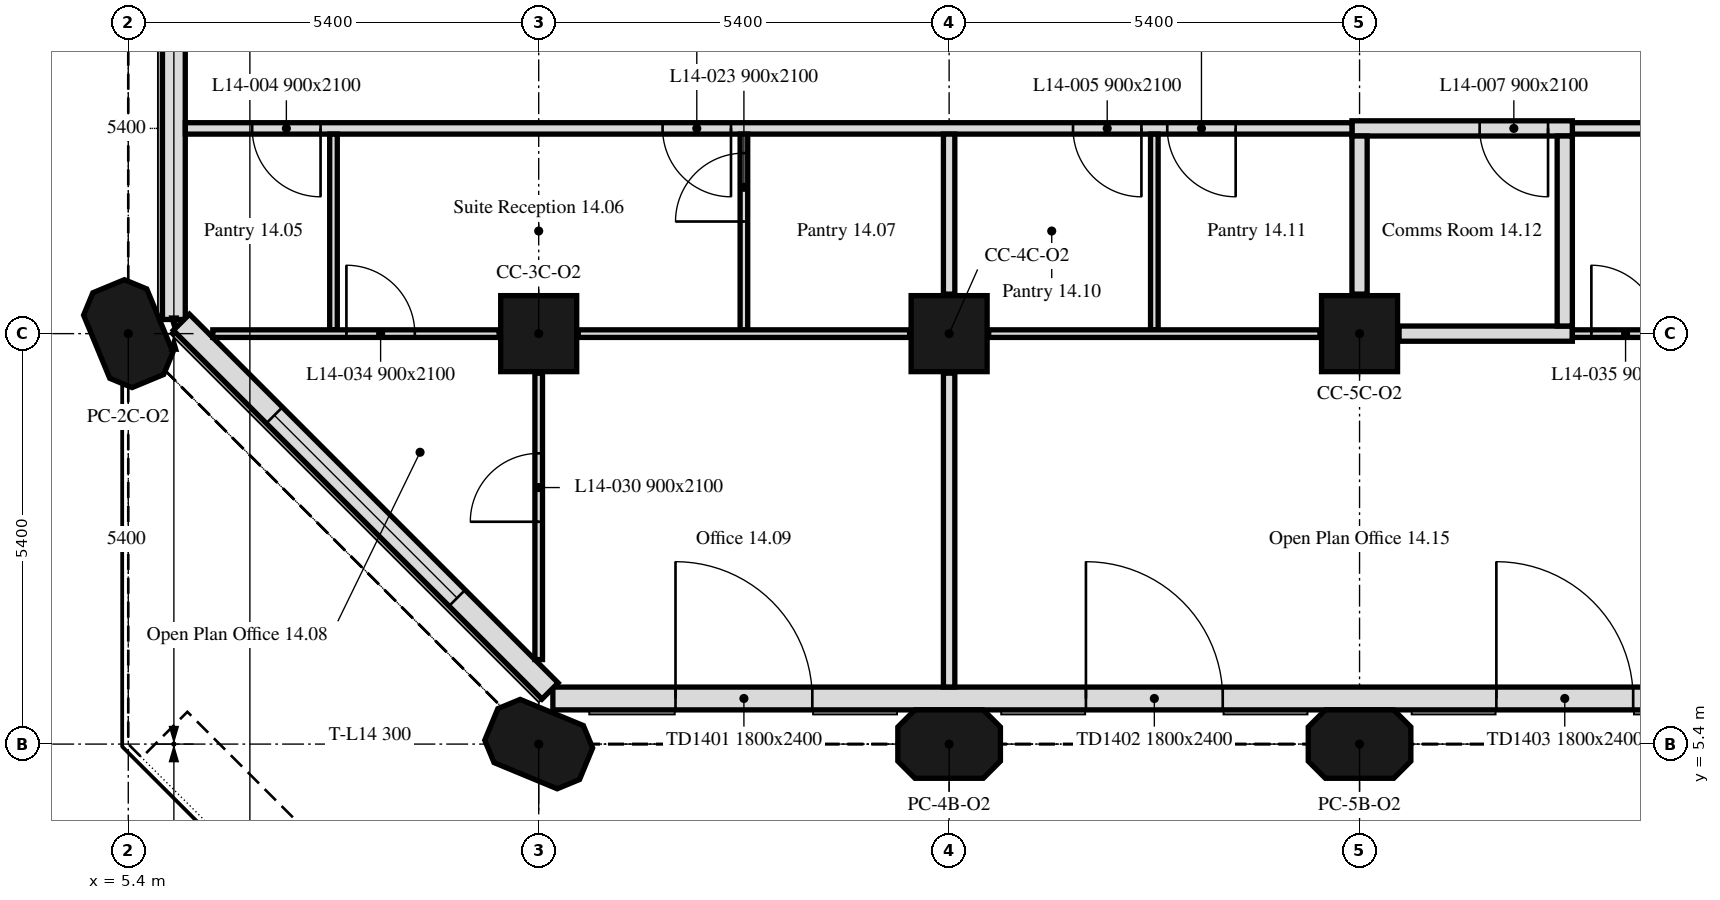
"""IFC4 building model, lengths in metres.
Left out: names, types, materials, properties, quantities, classifications, styles, units other than length and angle.
Written with IfcOpenShell. Run it as: python <this file> out.ifc"""

import sys

from ifc_helpers import new_model, si_unit, direction, frame, frame_2d, origin, origin_2d, place, context, subcontext, project, spatial, polyline, rectangle, outline, extrude, element, fill, save


model = new_model("IFC4")
c1 = context("Model", 3, precision=1e-05, world=origin(), true_north=direction((0.0, 1.0)))
c2 = subcontext(c1, "Body", "Model", "MODEL_VIEW")
j1 = project(units=[si_unit("LENGTHUNIT", "METRE"), si_unit("PLANEANGLEUNIT", "RADIAN")], contexts=[c1])
p1 = place(None, origin())
s1 = spatial("IfcSite", under=j1, at=p1, CompositionType="ELEMENT")
p2 = place(p1, origin())
s2 = spatial("IfcBuilding", under=s1, at=p2, CompositionType="ELEMENT")
p3 = place(p2, frame((0.0, 0.0, 65.0)))
s3 = spatial("IfcBuildingStorey", under=s2, at=p3, CompositionType="ELEMENT", Elevation=65.0)
for number, where, z_axis, x_axis in (
    (1, (10.8, 5.4, 0.0), (0.0, 0.0, 1.0), (-0.924, 0.383, 0.0)),
    (2, (16.2, 5.4, 0.0), (0.0, 0.0, 1.0), (1.0, 0.0, 0.0)),
    (3, (21.6, 5.4, 0.0), (0.0, 0.0, 1.0), (1.0, 0.0, 0.0)),
    (4, (5.4, 10.8, 0.0), (0.0, 0.0, 1.0), (-0.383, 0.924, 0.0)),
):
    element("IfcColumn", number, at=place(p3, frame(where, z_axis=z_axis, x_axis=x_axis)), inside=s3, PredefinedType="COLUMN", context=c2, shape_type="SweptSolid", body=[
        extrude(outline(polyline([(-0.45, -0.45), (0.45, -0.45), (0.675, -0.225), (0.675, 0.225), (0.45, 0.45), (-0.45, 0.45), (-0.675, 0.225), (-0.675, -0.225), (-0.45, -0.45)])), origin(), (0.0, 0.0, 1.0), 3.5),
    ])
for number, where, z_axis, x_axis in (
    (5, (10.8, 10.8, 0.0), (0.0, 0.0, 1.0), (1.0, 0.0, 0.0)),
    (6, (16.2, 10.8, 0.0), (0.0, 0.0, 1.0), (1.0, 0.0, 0.0)),
    (7, (21.6, 10.8, 0.0), (0.0, 0.0, 1.0), (1.0, 0.0, 0.0)),
):
    element("IfcColumn", number, at=place(p3, frame(where, z_axis=z_axis, x_axis=x_axis)), inside=s3, PredefinedType="COLUMN", context=c2, shape_type="SweptSolid", body=[
        extrude(rectangle(XDim=1.0, YDim=1.0, at=origin_2d()), origin(), (0.0, 0.0, 1.0), 3.5),
    ])
p4 = place(p3, frame((10.986, 6.0, 0.0), z_axis=(0.0, 0.0, 1.0), x_axis=(1.0, 0.0, 0.0)))
e8 = element("IfcWall", 8, at=p4, inside=s3, PredefinedType="SOLIDWALL", context=c2, shape_type="SweptSolid", body=[
    extrude(rectangle(XDim=32.027, YDim=0.3, at=frame_2d((16.014, 0.0))), origin(), (0.0, 0.0, 1.0), 3.5),
])
p5 = place(p4, frame((1.614, 0.0, 0.0)))
e9 = element("IfcOpeningElement", 9, at=p5, cuts=e8, PredefinedType="OPENING", context=c2, shape_type="SweptSolid", body=[
    extrude(rectangle(XDim=1.8, YDim=2.4, at=frame_2d((0.9, 1.2))), frame((0.0, 0.16, 0.0), z_axis=(0.0, -1.0, 0.0), x_axis=(1.0, 0.0, 0.0)), (0.0, 0.0, 1.0), 0.32),
])
p6 = place(p4, frame((7.014, 0.0, 0.0)))
e10 = element("IfcOpeningElement", 10, at=p6, cuts=e8, PredefinedType="OPENING", context=c2, shape_type="SweptSolid", body=[
    extrude(rectangle(XDim=1.8, YDim=2.4, at=frame_2d((0.9, 1.2))), frame((0.0, 0.16, 0.0), z_axis=(0.0, -1.0, 0.0), x_axis=(1.0, 0.0, 0.0)), (0.0, 0.0, 1.0), 0.32),
])
p7 = place(p4, frame((12.414, 0.0, 0.0)))
e11 = element("IfcOpeningElement", 11, at=p7, cuts=e8, PredefinedType="OPENING", context=c2, shape_type="SweptSolid", body=[
    extrude(rectangle(XDim=1.8, YDim=2.4, at=frame_2d((0.9, 1.2))), frame((0.0, 0.16, 0.0), z_axis=(0.0, -1.0, 0.0), x_axis=(1.0, 0.0, 0.0)), (0.0, 0.0, 1.0), 0.32),
])
p8 = place(p4, frame((17.814, 0.0, 0.0)))
e12 = element("IfcOpeningElement", 12, at=p8, cuts=e8, PredefinedType="OPENING", context=c2, shape_type="SweptSolid", body=[
    extrude(rectangle(XDim=1.8, YDim=2.4, at=frame_2d((0.9, 1.2))), frame((0.0, 0.16, 0.0), z_axis=(0.0, -1.0, 0.0), x_axis=(1.0, 0.0, 0.0)), (0.0, 0.0, 1.0), 0.32),
])
p9 = place(p4, frame((23.214, 0.0, 0.0)))
e13 = element("IfcOpeningElement", 13, at=p9, cuts=e8, PredefinedType="OPENING", context=c2, shape_type="SweptSolid", body=[
    extrude(rectangle(XDim=1.8, YDim=2.4, at=frame_2d((0.9, 1.2))), frame((0.0, 0.16, 0.0), z_axis=(0.0, -1.0, 0.0), x_axis=(1.0, 0.0, 0.0)), (0.0, 0.0, 1.0), 0.32),
])
p10 = place(p4, frame((28.614, 0.0, 0.0)))
e14 = element("IfcOpeningElement", 14, at=p10, cuts=e8, PredefinedType="OPENING", context=c2, shape_type="SweptSolid", body=[
    extrude(rectangle(XDim=1.8, YDim=2.4, at=frame_2d((0.9, 1.2))), frame((0.0, 0.16, 0.0), z_axis=(0.0, -1.0, 0.0), x_axis=(1.0, 0.0, 0.0)), (0.0, 0.0, 1.0), 0.32),
])
p11 = place(p3, frame((6.0, 16.2, 0.0), z_axis=(0.0, 0.0, 1.0), x_axis=(0.0, -1.0, 0.0)))
e15 = element("IfcWall", 15, at=p11, inside=s3, PredefinedType="SOLIDWALL", context=c2, shape_type="SweptSolid", body=[
    extrude(rectangle(XDim=5.214, YDim=0.3, at=frame_2d((2.607, 0.0))), origin(), (0.0, 0.0, 1.0), 3.5),
])
p12 = place(p3, frame((6.099, 10.949, 0.0), z_axis=(0.0, 0.0, 1.0), x_axis=(0.707106781187, -0.707106781187, 0.0)))
e16 = element("IfcWall", 16, at=p12, inside=s3, PredefinedType="SOLIDWALL", context=c2, shape_type="SweptSolid", body=[
    extrude(rectangle(XDim=6.86, YDim=0.3, at=frame_2d((3.43, 0.0))), origin(), (0.0, 0.0, 1.0), 3.5),
])
p13 = place(p12, frame((1.73, 0.0, 0.9)))
e17 = element("IfcOpeningElement", 17, at=p13, cuts=e16, PredefinedType="OPENING", context=c2, shape_type="SweptSolid", body=[
    extrude(rectangle(XDim=3.4, YDim=1.7, at=frame_2d((1.7, 0.85))), frame((0.0, 0.16, 0.0), z_axis=(0.0, -1.0, 0.0), x_axis=(1.0, 0.0, 0.0)), (0.0, 0.0, 1.0), 0.32),
])
p14 = place(p3, frame((37.7, 13.5, 0.0), z_axis=(0.0, 0.0, 1.0), x_axis=(-1.0, 0.0, 0.0)))
e18 = element("IfcWall", 18, at=p14, inside=s3, PredefinedType="PARTITIONING", context=c2, shape_type="SweptSolid", body=[
    extrude(rectangle(XDim=13.3, YDim=0.15, at=frame_2d((6.65, 0.0))), origin(), (0.0, 0.0, 1.0), 3.5),
])
p15 = place(p14, frame((2.15, 0.0, 0.0)))
e19 = element("IfcOpeningElement", 19, at=p15, cuts=e18, PredefinedType="OPENING", context=c2, shape_type="SweptSolid", body=[
    extrude(rectangle(XDim=0.9, YDim=2.1, at=frame_2d((0.45, 1.05))), frame((0.0, 0.075, 0.0), z_axis=(0.0, -1.0, 0.0), x_axis=(1.0, 0.0, 0.0)), (0.0, 0.0, 1.0), 0.15),
])
p16 = place(p14, frame((8.17, 0.0, 0.0)))
e20 = element("IfcOpeningElement", 20, at=p16, cuts=e18, PredefinedType="OPENING", context=c2, shape_type="SweptSolid", body=[
    extrude(rectangle(XDim=0.9, YDim=2.1, at=frame_2d((0.45, 1.05))), frame((0.0, 0.075, 0.0), z_axis=(0.0, -1.0, 0.0), x_axis=(1.0, 0.0, 0.0)), (0.0, 0.0, 1.0), 0.15),
])
p17 = place(p3, frame((24.4, 13.5, 0.0), z_axis=(0.0, 0.0, 1.0), x_axis=(-1.0, 0.0, 0.0)))
e21 = element("IfcWall", 21, at=p17, inside=s3, PredefinedType="PARTITIONING", context=c2, shape_type="SweptSolid", body=[
    extrude(rectangle(XDim=2.9, YDim=0.2, at=frame_2d((1.45, 0.0))), origin(), (0.0, 0.0, 1.0), 3.5),
])
p18 = place(p17, frame((0.32, 0.0, 0.0)))
e22 = element("IfcOpeningElement", 22, at=p18, cuts=e21, PredefinedType="OPENING", context=c2, shape_type="SweptSolid", body=[
    extrude(rectangle(XDim=0.9, YDim=2.1, at=frame_2d((0.45, 1.05))), frame((0.0, 0.1, 0.0), z_axis=(0.0, -1.0, 0.0), x_axis=(1.0, 0.0, 0.0)), (0.0, 0.0, 1.0), 0.2),
])
p19 = place(p3, frame((21.5, 13.5, 0.0), z_axis=(0.0, 0.0, 1.0), x_axis=(-1.0, 0.0, 0.0)))
e23 = element("IfcWall", 23, at=p19, inside=s3, PredefinedType="PARTITIONING", context=c2, shape_type="SweptSolid", body=[
    extrude(rectangle(XDim=15.349, YDim=0.15, at=frame_2d((7.675, 0.0))), origin(), (0.0, 0.0, 1.0), 3.5),
])
p20 = place(p19, frame((13.57, 0.0, 0.0)))
e24 = element("IfcOpeningElement", 24, at=p20, cuts=e23, PredefinedType="OPENING", context=c2, shape_type="SweptSolid", body=[
    extrude(rectangle(XDim=0.9, YDim=2.1, at=frame_2d((0.45, 1.05))), frame((0.0, 0.075, 0.0), z_axis=(0.0, -1.0, 0.0), x_axis=(1.0, 0.0, 0.0)), (0.0, 0.0, 1.0), 0.15),
])
p21 = place(p19, frame((2.77, 0.0, 0.0)))
e25 = element("IfcOpeningElement", 25, at=p21, cuts=e23, PredefinedType="OPENING", context=c2, shape_type="SweptSolid", body=[
    extrude(rectangle(XDim=0.9, YDim=2.1, at=frame_2d((0.45, 1.05))), frame((0.0, 0.075, 0.0), z_axis=(0.0, -1.0, 0.0), x_axis=(1.0, 0.0, 0.0)), (0.0, 0.0, 1.0), 0.15),
])
p22 = place(p19, frame((1.53, 0.0, 0.0)))
e26 = element("IfcOpeningElement", 26, at=p22, cuts=e23, PredefinedType="OPENING", context=c2, shape_type="SweptSolid", body=[
    extrude(rectangle(XDim=0.9, YDim=2.1, at=frame_2d((0.45, 1.05))), frame((0.0, 0.075, 0.0), z_axis=(0.0, -1.0, 0.0), x_axis=(1.0, 0.0, 0.0)), (0.0, 0.0, 1.0), 0.15),
])
p23 = place(p19, frame((8.17, 0.0, 0.0)))
e27 = element("IfcOpeningElement", 27, at=p23, cuts=e23, PredefinedType="OPENING", context=c2, shape_type="SweptSolid", body=[
    extrude(rectangle(XDim=0.9, YDim=2.1, at=frame_2d((0.45, 1.05))), frame((0.0, 0.075, 0.0), z_axis=(0.0, -1.0, 0.0), x_axis=(1.0, 0.0, 0.0)), (0.0, 0.0, 1.0), 0.15),
])
p24 = place(p3, frame((8.1, 10.85, 0.0), z_axis=(0.0, 0.0, 1.0), x_axis=(0.0, 1.0, 0.0)))
e28 = element("IfcWall", 28, at=p24, inside=s3, PredefinedType="PARTITIONING", context=c2, shape_type="SweptSolid", body=[
    extrude(rectangle(XDim=2.575, YDim=0.1, at=frame_2d((1.288, 0.0))), origin(), (0.0, 0.0, 1.0), 3.5),
])
p25 = place(p3, frame((6.512, 10.8, 0.0), z_axis=(0.0, 0.0, 1.0), x_axis=(1.0, 0.0, 0.0)))
e29 = element("IfcWall", 29, at=p25, inside=s3, PredefinedType="PARTITIONING", context=c2, shape_type="SweptSolid", body=[
    extrude(rectangle(XDim=3.768, YDim=0.1, at=frame_2d((1.884, 0.0))), origin(), (0.0, 0.0, 1.0), 3.5),
])
p26 = place(p25, frame((1.758, 0.0, 0.0)))
e30 = element("IfcOpeningElement", 30, at=p26, cuts=e29, PredefinedType="OPENING", context=c2, shape_type="SweptSolid", body=[
    extrude(rectangle(XDim=0.9, YDim=2.1, at=frame_2d((0.45, 1.05))), frame((0.0, 0.05, 0.0), z_axis=(0.0, -1.0, 0.0), x_axis=(1.0, 0.0, 0.0)), (0.0, 0.0, 1.0), 0.1),
])
p27 = place(p3, frame((13.5, 10.85, 0.0), z_axis=(0.0, 0.0, 1.0), x_axis=(0.0, 1.0, 0.0)))
e31 = element("IfcWall", 31, at=p27, inside=s3, PredefinedType="PARTITIONING", context=c2, shape_type="SweptSolid", body=[
    extrude(rectangle(XDim=2.575, YDim=0.1, at=frame_2d((1.288, 0.0))), origin(), (0.0, 0.0, 1.0), 3.5),
])
p28 = place(p27, frame((1.425, 0.0, 0.0)))
e32 = element("IfcOpeningElement", 32, at=p28, cuts=e31, PredefinedType="OPENING", context=c2, shape_type="SweptSolid", body=[
    extrude(rectangle(XDim=0.9, YDim=2.1, at=frame_2d((0.45, 1.05))), frame((0.0, 0.05, 0.0), z_axis=(0.0, -1.0, 0.0), x_axis=(1.0, 0.0, 0.0)), (0.0, 0.0, 1.0), 0.1),
])
p29 = place(p3, frame((11.32, 10.8, 0.0), z_axis=(0.0, 0.0, 1.0), x_axis=(1.0, 0.0, 0.0)))
e33 = element("IfcWall", 33, at=p29, inside=s3, PredefinedType="PARTITIONING", context=c2, shape_type="SweptSolid", body=[
    extrude(rectangle(XDim=4.36, YDim=0.1, at=frame_2d((2.18, 0.0))), origin(), (0.0, 0.0, 1.0), 3.5),
])
p30 = place(p3, frame((16.2, 11.32, 0.0), z_axis=(0.0, 0.0, 1.0), x_axis=(0.0, 1.0, 0.0)))
e34 = element("IfcWall", 34, at=p30, inside=s3, PredefinedType="PARTITIONING", context=c2, shape_type="SweptSolid", body=[
    extrude(rectangle(XDim=2.105, YDim=0.15, at=frame_2d((1.052, 0.0))), origin(), (0.0, 0.0, 1.0), 3.5),
])
p31 = place(p3, frame((10.8, 6.512, 0.0), z_axis=(0.0, 0.0, 1.0), x_axis=(0.0, 1.0, 0.0)))
e35 = element("IfcWall", 35, at=p31, inside=s3, PredefinedType="PARTITIONING", context=c2, shape_type="SweptSolid", body=[
    extrude(rectangle(XDim=3.768, YDim=0.1, at=frame_2d((1.884, 0.0))), origin(), (0.0, 0.0, 1.0), 3.5),
])
p32 = place(p31, frame((1.813, 0.0, 0.0)))
e36 = element("IfcOpeningElement", 36, at=p32, cuts=e35, PredefinedType="OPENING", context=c2, shape_type="SweptSolid", body=[
    extrude(rectangle(XDim=0.9, YDim=2.1, at=frame_2d((0.45, 1.05))), frame((0.0, 0.05, 0.0), z_axis=(0.0, -1.0, 0.0), x_axis=(1.0, 0.0, 0.0)), (0.0, 0.0, 1.0), 0.1),
])
p33 = place(p3, frame((16.2, 6.151, 0.0), z_axis=(0.0, 0.0, 1.0), x_axis=(0.0, 1.0, 0.0)))
e37 = element("IfcWall", 37, at=p33, inside=s3, PredefinedType="PARTITIONING", context=c2, shape_type="SweptSolid", body=[
    extrude(rectangle(XDim=4.129, YDim=0.15, at=frame_2d((2.064, 0.0))), origin(), (0.0, 0.0, 1.0), 3.5),
])
p34 = place(p3, frame((18.9, 10.85, 0.0), z_axis=(0.0, 0.0, 1.0), x_axis=(0.0, 1.0, 0.0)))
e38 = element("IfcWall", 38, at=p34, inside=s3, PredefinedType="PARTITIONING", context=c2, shape_type="SweptSolid", body=[
    extrude(rectangle(XDim=2.575, YDim=0.1, at=frame_2d((1.288, 0.0))), origin(), (0.0, 0.0, 1.0), 3.5),
])
p35 = place(p3, frame((16.72, 10.8, 0.0), z_axis=(0.0, 0.0, 1.0), x_axis=(1.0, 0.0, 0.0)))
e39 = element("IfcWall", 39, at=p35, inside=s3, PredefinedType="PARTITIONING", context=c2, shape_type="SweptSolid", body=[
    extrude(rectangle(XDim=4.36, YDim=0.1, at=frame_2d((2.18, 0.0))), origin(), (0.0, 0.0, 1.0), 3.5),
])
p36 = place(p3, frame((21.6, 11.32, 0.0), z_axis=(0.0, 0.0, 1.0), x_axis=(0.0, 1.0, 0.0)))
e40 = element("IfcWall", 40, at=p36, inside=s3, PredefinedType="PARTITIONING", context=c2, shape_type="SweptSolid", body=[
    extrude(rectangle(XDim=2.08, YDim=0.2, at=frame_2d((1.04, 0.0))), origin(), (0.0, 0.0, 1.0), 3.5),
])
p37 = place(p3, frame((22.12, 10.8, 0.0), z_axis=(0.0, 0.0, 1.0), x_axis=(1.0, 0.0, 0.0)))
e41 = element("IfcWall", 41, at=p37, inside=s3, PredefinedType="PARTITIONING", context=c2, shape_type="SweptSolid", body=[
    extrude(rectangle(XDim=2.28, YDim=0.2, at=frame_2d((1.14, 0.0))), origin(), (0.0, 0.0, 1.0), 3.5),
])
p38 = place(p3, frame((24.3, 10.9, 0.0), z_axis=(0.0, 0.0, 1.0), x_axis=(0.0, 1.0, 0.0)))
e42 = element("IfcWall", 42, at=p38, inside=s3, PredefinedType="PARTITIONING", context=c2, shape_type="SweptSolid", body=[
    extrude(rectangle(XDim=2.5, YDim=0.2, at=frame_2d((1.25, 0.0))), origin(), (0.0, 0.0, 1.0), 3.5),
])
p39 = place(p3, frame((24.4, 10.8, 0.0), z_axis=(0.0, 0.0, 1.0), x_axis=(1.0, 0.0, 0.0)))
e43 = element("IfcWall", 43, at=p39, inside=s3, PredefinedType="PARTITIONING", context=c2, shape_type="SweptSolid", body=[
    extrude(rectangle(XDim=2.08, YDim=0.1, at=frame_2d((1.04, 0.0))), origin(), (0.0, 0.0, 1.0), 3.5),
])
p40 = place(p39, frame((0.25, 0.0, 0.0)))
e44 = element("IfcOpeningElement", 44, at=p40, cuts=e43, PredefinedType="OPENING", context=c2, shape_type="SweptSolid", body=[
    extrude(rectangle(XDim=0.9, YDim=2.1, at=frame_2d((0.45, 1.05))), frame((0.0, 0.05, 0.0), z_axis=(0.0, -1.0, 0.0), x_axis=(1.0, 0.0, 0.0)), (0.0, 0.0, 1.0), 0.1),
])
p41 = place(p5, origin())
e45 = element("IfcDoor", 45, at=p41, inside=s3, OperationType="DOUBLE_DOOR_DOUBLE_SWING", PredefinedType="DOOR", context=c2, shape_type="SweptSolid", body=[
    extrude(rectangle(XDim=1.8, YDim=2.4, at=frame_2d((0.9, 1.2))), frame((0.0, 0.025, 0.0), z_axis=(0.0, -1.0, 0.0), x_axis=(1.0, 0.0, 0.0)), (0.0, 0.0, 1.0), 0.05),
])
fill(e9, e45)
p42 = place(p6, origin())
e46 = element("IfcDoor", 46, at=p42, inside=s3, OperationType="DOUBLE_DOOR_DOUBLE_SWING", PredefinedType="DOOR", context=c2, shape_type="SweptSolid", body=[
    extrude(rectangle(XDim=1.8, YDim=2.4, at=frame_2d((0.9, 1.2))), frame((0.0, 0.025, 0.0), z_axis=(0.0, -1.0, 0.0), x_axis=(1.0, 0.0, 0.0)), (0.0, 0.0, 1.0), 0.05),
])
fill(e10, e46)
p43 = place(p7, origin())
e47 = element("IfcDoor", 47, at=p43, inside=s3, OperationType="DOUBLE_DOOR_DOUBLE_SWING", PredefinedType="DOOR", context=c2, shape_type="SweptSolid", body=[
    extrude(rectangle(XDim=1.8, YDim=2.4, at=frame_2d((0.9, 1.2))), frame((0.0, 0.025, 0.0), z_axis=(0.0, -1.0, 0.0), x_axis=(1.0, 0.0, 0.0)), (0.0, 0.0, 1.0), 0.05),
])
fill(e11, e47)
p44 = place(p13, origin())
e48 = element("IfcWindow", 48, at=p44, inside=s3, PartitioningType="SINGLE_PANEL", PredefinedType="WINDOW", context=c2, shape_type="SweptSolid", body=[
    extrude(rectangle(XDim=3.4, YDim=1.7, at=frame_2d((1.7, 0.85))), frame((0.0, 0.03, 0.0), z_axis=(0.0, -1.0, 0.0), x_axis=(1.0, 0.0, 0.0)), (0.0, 0.0, 1.0), 0.06),
])
fill(e17, e48)
p45 = place(p20, origin())
e49 = element("IfcDoor", 49, at=p45, inside=s3, OperationType="SINGLE_SWING_LEFT", PredefinedType="DOOR", context=c2, shape_type="SweptSolid", body=[
    extrude(rectangle(XDim=0.9, YDim=2.1, at=frame_2d((0.45, 1.05))), frame((0.0, 0.025, 0.0), z_axis=(0.0, -1.0, 0.0), x_axis=(1.0, 0.0, 0.0)), (0.0, 0.0, 1.0), 0.05),
])
fill(e24, e49)
p46 = place(p21, origin())
e50 = element("IfcDoor", 50, at=p46, inside=s3, OperationType="SINGLE_SWING_LEFT", PredefinedType="DOOR", context=c2, shape_type="SweptSolid", body=[
    extrude(rectangle(XDim=0.9, YDim=2.1, at=frame_2d((0.45, 1.05))), frame((0.0, 0.025, 0.0), z_axis=(0.0, -1.0, 0.0), x_axis=(1.0, 0.0, 0.0)), (0.0, 0.0, 1.0), 0.05),
])
fill(e25, e50)
p47 = place(p22, origin())
e51 = element("IfcDoor", 51, at=p47, inside=s3, OperationType="SINGLE_SWING_LEFT", PredefinedType="DOOR", context=c2, shape_type="SweptSolid", body=[
    extrude(rectangle(XDim=0.9, YDim=2.1, at=frame_2d((0.45, 1.05))), frame((0.0, 0.025, 0.0), z_axis=(0.0, -1.0, 0.0), x_axis=(1.0, 0.0, 0.0)), (0.0, 0.0, 1.0), 0.05),
])
fill(e26, e51)
p48 = place(p18, origin())
e52 = element("IfcDoor", 52, at=p48, inside=s3, OperationType="SINGLE_SWING_LEFT", PredefinedType="DOOR", context=c2, shape_type="SweptSolid", body=[
    extrude(rectangle(XDim=0.9, YDim=2.1, at=frame_2d((0.45, 1.05))), frame((0.0, 0.025, 0.0), z_axis=(0.0, -1.0, 0.0), x_axis=(1.0, 0.0, 0.0)), (0.0, 0.0, 1.0), 0.05),
])
fill(e22, e52)
p49 = place(p28, origin())
e53 = element("IfcDoor", 53, at=p49, inside=s3, OperationType="SINGLE_SWING_LEFT", PredefinedType="DOOR", context=c2, shape_type="SweptSolid", body=[
    extrude(rectangle(XDim=0.9, YDim=2.1, at=frame_2d((0.45, 1.05))), frame((0.0, 0.025, 0.0), z_axis=(0.0, -1.0, 0.0), x_axis=(1.0, 0.0, 0.0)), (0.0, 0.0, 1.0), 0.05),
])
fill(e32, e53)
p50 = place(p32, origin())
e54 = element("IfcDoor", 54, at=p50, inside=s3, OperationType="SINGLE_SWING_LEFT", PredefinedType="DOOR", context=c2, shape_type="SweptSolid", body=[
    extrude(rectangle(XDim=0.9, YDim=2.1, at=frame_2d((0.45, 1.05))), frame((0.0, 0.025, 0.0), z_axis=(0.0, -1.0, 0.0), x_axis=(1.0, 0.0, 0.0)), (0.0, 0.0, 1.0), 0.05),
])
fill(e36, e54)
p51 = place(p23, origin())
e55 = element("IfcDoor", 55, at=p51, inside=s3, OperationType="SINGLE_SWING_LEFT", PredefinedType="DOOR", context=c2, shape_type="SweptSolid", body=[
    extrude(rectangle(XDim=0.9, YDim=2.1, at=frame_2d((0.45, 1.05))), frame((0.0, 0.025, 0.0), z_axis=(0.0, -1.0, 0.0), x_axis=(1.0, 0.0, 0.0)), (0.0, 0.0, 1.0), 0.05),
])
fill(e27, e55)
p52 = place(p26, origin())
e56 = element("IfcDoor", 56, at=p52, inside=s3, OperationType="SINGLE_SWING_RIGHT", PredefinedType="DOOR", context=c2, shape_type="SweptSolid", body=[
    extrude(rectangle(XDim=0.9, YDim=2.1, at=frame_2d((0.45, 1.05))), frame((0.0, 0.025, 0.0), z_axis=(0.0, -1.0, 0.0), x_axis=(1.0, 0.0, 0.0)), (0.0, 0.0, 1.0), 0.05),
])
fill(e30, e56)
p53 = place(p40, origin())
e57 = element("IfcDoor", 57, at=p53, inside=s3, OperationType="SINGLE_SWING_LEFT", PredefinedType="DOOR", context=c2, shape_type="SweptSolid", body=[
    extrude(rectangle(XDim=0.9, YDim=2.1, at=frame_2d((0.45, 1.05))), frame((0.0, 0.025, 0.0), z_axis=(0.0, -1.0, 0.0), x_axis=(1.0, 0.0, 0.0)), (0.0, 0.0, 1.0), 0.05),
])
fill(e44, e57)
save(model, sys.argv[1])
